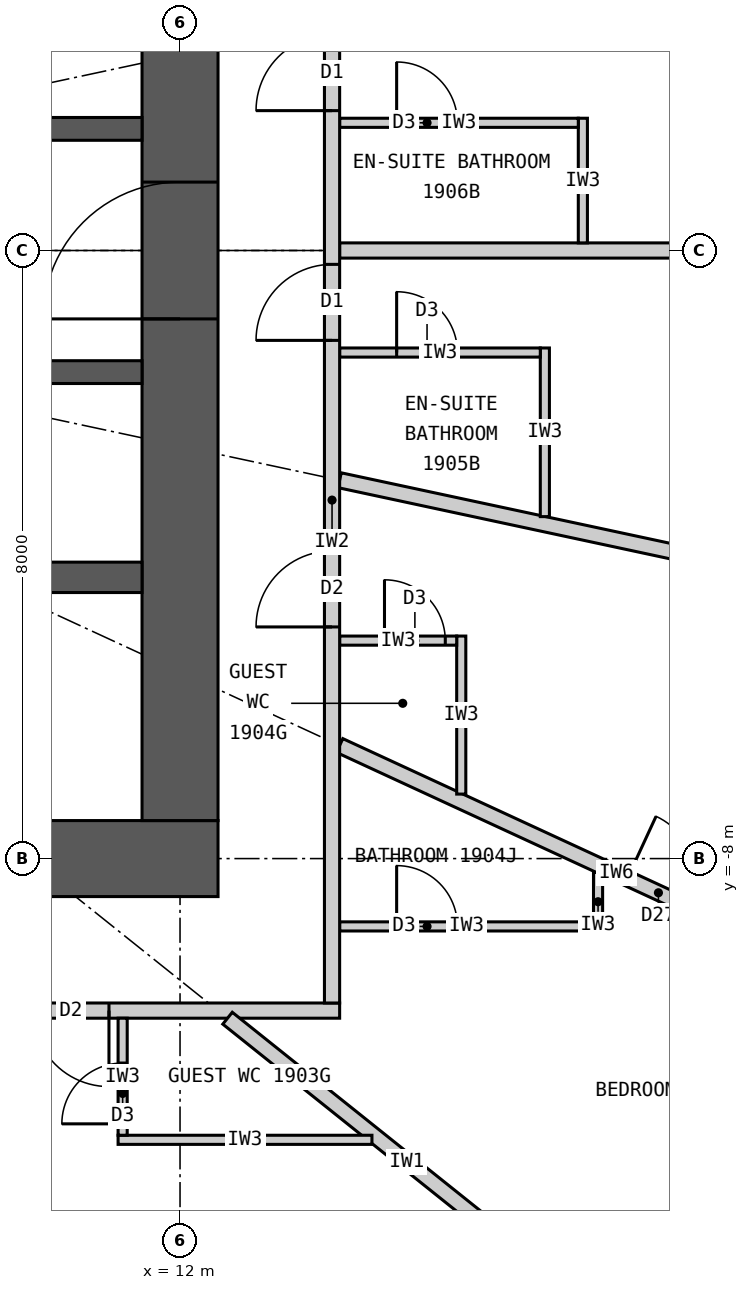
"""IFC4 building model, lengths in metres.
Left out: names, types, materials, properties, quantities, classifications, styles, units other than length and angle.
Written with IfcOpenShell. Run it as: python <this file> out.ifc"""

import sys

from ifc_helpers import new_model, si_unit, direction, frame, frame_2d, origin, place, context, subcontext, project, spatial, rectangle, extrude, element, fill, save


model = new_model("IFC4")
c1 = context("Model", 3, precision=1e-05, world=origin(), true_north=direction((0.0, 1.0)))
c2 = subcontext(c1, "Body", "Model", "MODEL_VIEW")
j1 = project(units=[si_unit("LENGTHUNIT", "METRE"), si_unit("PLANEANGLEUNIT", "RADIAN")], contexts=[c1])
p1 = place(None, origin())
s1 = spatial("IfcSite", under=j1, at=p1, CompositionType="ELEMENT")
p2 = place(p1, origin())
s2 = spatial("IfcBuilding", under=s1, at=p2, CompositionType="ELEMENT")
p3 = place(p2, frame((0.0, 0.0, 77.1)))
s3 = spatial("IfcBuildingStorey", under=s2, at=p3, CompositionType="ELEMENT", Elevation=77.1)
p4 = place(p3, frame((12.5, -8.0, 0.0), z_axis=(0.0, 0.0, 1.0), x_axis=(-1.0, 0.0, 0.0)))
e1 = element("IfcWall", 1, at=p4, inside=s3, PredefinedType="SHEAR", context=c2, shape_type="SweptSolid", body=[
    extrude(rectangle(XDim=25.0, YDim=1.0, at=frame_2d((12.5, 0.0))), origin(), (0.0, 0.0, 1.0), 3.3),
])
p5 = place(p4, frame((11.2, 0.0, 0.0)))
e2 = element("IfcOpeningElement", 2, at=p5, cuts=e1, PredefinedType="OPENING", context=c2, shape_type="SweptSolid", body=[
    extrude(rectangle(XDim=1.2, YDim=2.2, at=frame_2d((0.6, 1.1))), frame((0.0, 0.51, 0.0), z_axis=(0.0, -1.0, 0.0), x_axis=(1.0, 0.0, 0.0)), (0.0, 0.0, 1.0), 1.02),
])
p6 = place(p4, frame((18.8, 0.0, 0.0)))
e3 = element("IfcOpeningElement", 3, at=p6, cuts=e1, PredefinedType="OPENING", context=c2, shape_type="SweptSolid", body=[
    extrude(rectangle(XDim=0.9, YDim=2.2, at=frame_2d((0.45, 1.1))), frame((0.0, 0.51, 0.0), z_axis=(0.0, -1.0, 0.0), x_axis=(1.0, 0.0, 0.0)), (0.0, 0.0, 1.0), 1.02),
])
p7 = place(p3, frame((12.0, -7.5, 0.0), z_axis=(0.0, 0.0, 1.0), x_axis=(0.0, 1.0, 0.0)))
e4 = element("IfcWall", 4, at=p7, inside=s3, PredefinedType="SHEAR", context=c2, shape_type="SweptSolid", body=[
    extrude(rectangle(XDim=15.0, YDim=1.0, at=frame_2d((7.5, 0.0))), origin(), (0.0, 0.0, 1.0), 3.3),
])
p8 = place(p7, frame((6.6, 0.0, 0.0)))
e5 = element("IfcOpeningElement", 5, at=p8, cuts=e4, PredefinedType="OPENING", context=c2, shape_type="SweptSolid", body=[
    extrude(rectangle(XDim=1.8, YDim=2.2, at=frame_2d((0.9, 1.1))), frame((0.0, 0.51, 0.0), z_axis=(0.0, -1.0, 0.0), x_axis=(1.0, 0.0, 0.0)), (0.0, 0.0, 1.0), 1.02),
])
p9 = place(p3, frame((-11.5, 1.6, 0.0), z_axis=(0.0, 0.0, 1.0), x_axis=(1.0, 0.0, 0.0)))
e6 = element("IfcWall", 6, at=p9, inside=s3, PredefinedType="SHEAR", context=c2, shape_type="SweptSolid", body=[
    extrude(rectangle(XDim=23.0, YDim=0.3, at=frame_2d((11.5, 0.0))), origin(), (0.0, 0.0, 1.0), 3.3),
])
p10 = place(p9, frame((0.45, 0.0, 0.0)))
e7 = element("IfcOpeningElement", 7, at=p10, cuts=e6, PredefinedType="OPENING", context=c2, shape_type="SweptSolid", body=[
    extrude(rectangle(XDim=1.1, YDim=2.2, at=frame_2d((0.55, 1.1))), frame((0.0, 0.16, 0.0), z_axis=(0.0, -1.0, 0.0), x_axis=(1.0, 0.0, 0.0)), (0.0, 0.0, 1.0), 0.32),
])
p11 = place(p9, frame((3.45, 0.0, 0.0)))
e8 = element("IfcOpeningElement", 8, at=p11, cuts=e6, PredefinedType="OPENING", context=c2, shape_type="SweptSolid", body=[
    extrude(rectangle(XDim=1.1, YDim=2.2, at=frame_2d((0.55, 1.1))), frame((0.0, 0.16, 0.0), z_axis=(0.0, -1.0, 0.0), x_axis=(1.0, 0.0, 0.0)), (0.0, 0.0, 1.0), 0.32),
])
p12 = place(p9, frame((9.55, 0.0, 0.0)))
e9 = element("IfcOpeningElement", 9, at=p12, cuts=e6, PredefinedType="OPENING", context=c2, shape_type="SweptSolid", body=[
    extrude(rectangle(XDim=0.9, YDim=2.2, at=frame_2d((0.45, 1.1))), frame((0.0, 0.16, 0.0), z_axis=(0.0, -1.0, 0.0), x_axis=(1.0, 0.0, 0.0)), (0.0, 0.0, 1.0), 0.32),
])
p13 = place(p9, frame((15.55, 0.0, 0.0)))
e10 = element("IfcOpeningElement", 10, at=p13, cuts=e6, PredefinedType="OPENING", context=c2, shape_type="SweptSolid", body=[
    extrude(rectangle(XDim=0.9, YDim=2.2, at=frame_2d((0.45, 1.1))), frame((0.0, 0.16, 0.0), z_axis=(0.0, -1.0, 0.0), x_axis=(1.0, 0.0, 0.0)), (0.0, 0.0, 1.0), 0.32),
])
p14 = place(p3, frame((-11.5, -4.3, 0.0), z_axis=(0.0, 0.0, 1.0), x_axis=(1.0, 0.0, 0.0)))
e11 = element("IfcWall", 11, at=p14, inside=s3, PredefinedType="SHEAR", context=c2, shape_type="SweptSolid", body=[
    extrude(rectangle(XDim=23.0, YDim=0.4, at=frame_2d((11.5, 0.0))), origin(), (0.0, 0.0, 1.0), 3.3),
])
p15 = place(p3, frame((-11.5, -1.6, 0.0), z_axis=(0.0, 0.0, 1.0), x_axis=(1.0, 0.0, 0.0)))
e12 = element("IfcWall", 12, at=p15, inside=s3, PredefinedType="SHEAR", context=c2, shape_type="SweptSolid", body=[
    extrude(rectangle(XDim=23.0, YDim=0.3, at=frame_2d((11.5, 0.0))), origin(), (0.0, 0.0, 1.0), 3.3),
])
p16 = place(p15, frame((0.45, 0.0, 0.0)))
e13 = element("IfcOpeningElement", 13, at=p16, cuts=e12, PredefinedType="OPENING", context=c2, shape_type="SweptSolid", body=[
    extrude(rectangle(XDim=1.1, YDim=2.2, at=frame_2d((0.55, 1.1))), frame((0.0, 0.16, 0.0), z_axis=(0.0, -1.0, 0.0), x_axis=(1.0, 0.0, 0.0)), (0.0, 0.0, 1.0), 0.32),
])
p17 = place(p15, frame((3.45, 0.0, 0.0)))
e14 = element("IfcOpeningElement", 14, at=p17, cuts=e12, PredefinedType="OPENING", context=c2, shape_type="SweptSolid", body=[
    extrude(rectangle(XDim=1.1, YDim=2.2, at=frame_2d((0.55, 1.1))), frame((0.0, 0.16, 0.0), z_axis=(0.0, -1.0, 0.0), x_axis=(1.0, 0.0, 0.0)), (0.0, 0.0, 1.0), 0.32),
])
p18 = place(p15, frame((15.2, 0.0, 0.0)))
e15 = element("IfcOpeningElement", 15, at=p18, cuts=e12, PredefinedType="OPENING", context=c2, shape_type="SweptSolid", body=[
    extrude(rectangle(XDim=1.6, YDim=2.4, at=frame_2d((0.8, 1.2))), frame((0.0, 0.16, 0.0), z_axis=(0.0, -1.0, 0.0), x_axis=(1.0, 0.0, 0.0)), (0.0, 0.0, 1.0), 0.32),
])
p19 = place(p15, frame((6.55, 0.0, 0.0)))
e16 = element("IfcOpeningElement", 16, at=p19, cuts=e12, PredefinedType="OPENING", context=c2, shape_type="SweptSolid", body=[
    extrude(rectangle(XDim=0.9, YDim=2.2, at=frame_2d((0.45, 1.1))), frame((0.0, 0.16, 0.0), z_axis=(0.0, -1.0, 0.0), x_axis=(1.0, 0.0, 0.0)), (0.0, 0.0, 1.0), 0.32),
])
p20 = place(p15, frame((11.05, 0.0, 0.0)))
e17 = element("IfcOpeningElement", 17, at=p20, cuts=e12, PredefinedType="OPENING", context=c2, shape_type="SweptSolid", body=[
    extrude(rectangle(XDim=0.9, YDim=2.2, at=frame_2d((0.45, 1.1))), frame((0.0, 0.16, 0.0), z_axis=(0.0, -1.0, 0.0), x_axis=(1.0, 0.0, 0.0)), (0.0, 0.0, 1.0), 0.32),
])
p21 = place(p3, frame((14.1, -10.0, 0.0), z_axis=(0.0, 0.0, 1.0), x_axis=(-1.0, 0.0, 0.0)))
e18 = element("IfcWall", 18, at=p21, inside=s3, PredefinedType="PARTITIONING", context=c2, shape_type="SweptSolid", body=[
    extrude(rectangle(XDim=28.2, YDim=0.2, at=frame_2d((14.1, 0.0))), origin(), (0.0, 0.0, 1.0), 3.12),
])
p22 = place(p21, frame((24.165, 0.0, 0.0)))
e19 = element("IfcOpeningElement", 19, at=p22, cuts=e18, PredefinedType="OPENING", context=c2, shape_type="SweptSolid", body=[
    extrude(rectangle(XDim=1.0, YDim=2.2, at=frame_2d((0.5, 1.1))), frame((0.0, 0.11, 0.0), z_axis=(0.0, -1.0, 0.0), x_axis=(1.0, 0.0, 0.0)), (0.0, 0.0, 1.0), 0.22),
])
p23 = place(p21, frame((14.923, 0.0, 0.0)))
e20 = element("IfcOpeningElement", 20, at=p23, cuts=e18, PredefinedType="OPENING", context=c2, shape_type="SweptSolid", body=[
    extrude(rectangle(XDim=1.0, YDim=2.2, at=frame_2d((0.5, 1.1))), frame((0.0, 0.11, 0.0), z_axis=(0.0, -1.0, 0.0), x_axis=(1.0, 0.0, 0.0)), (0.0, 0.0, 1.0), 0.22),
])
p24 = place(p21, frame((3.035, 0.0, 0.0)))
e21 = element("IfcOpeningElement", 21, at=p24, cuts=e18, PredefinedType="OPENING", context=c2, shape_type="SweptSolid", body=[
    extrude(rectangle(XDim=1.0, YDim=2.2, at=frame_2d((0.5, 1.1))), frame((0.0, 0.11, 0.0), z_axis=(0.0, -1.0, 0.0), x_axis=(1.0, 0.0, 0.0)), (0.0, 0.0, 1.0), 0.22),
])
p25 = place(p3, frame((14.1, 0.0, 0.0), z_axis=(0.0, 0.0, 1.0), x_axis=(1.0, 0.0, 0.0)))
e22 = element("IfcWall", 22, at=p25, inside=s3, PredefinedType="PARTITIONING", context=c2, shape_type="SweptSolid", body=[
    extrude(rectangle(XDim=10.75, YDim=0.2, at=frame_2d((5.375, 0.0))), origin(), (0.0, 0.0, 1.0), 2.27),
])
p26 = place(p3, frame((7.289, -10.1, 0.0), z_axis=(0.0, 0.0, 1.0), x_axis=(0.585198353053, -0.810890182197, 0.0)))
e23 = element("IfcWall", 23, at=p26, inside=s3, PredefinedType="PARTITIONING", context=c2, shape_type="SweptSolid", body=[
    extrude(rectangle(XDim=8.36, YDim=0.2, at=frame_2d((4.18, 0.0))), origin(), (0.0, 0.0, 1.0), 2.32),
])
p27 = place(p26, frame((0.72, 0.0, 0.0)))
e24 = element("IfcOpeningElement", 24, at=p27, cuts=e23, PredefinedType="OPENING", context=c2, shape_type="SweptSolid", body=[
    extrude(rectangle(XDim=0.9, YDim=2.1, at=frame_2d((0.45, 1.05))), frame((0.0, 0.11, 0.0), z_axis=(0.0, -1.0, 0.0), x_axis=(1.0, 0.0, 0.0)), (0.0, 0.0, 1.0), 0.22),
])
p28 = place(p3, frame((12.625, -10.1, 0.0), z_axis=(0.0, 0.0, 1.0), x_axis=(0.780892451574, -0.624665493744, 0.0)))
e25 = element("IfcWall", 25, at=p28, inside=s3, PredefinedType="PARTITIONING", context=c2, shape_type="SweptSolid", body=[
    extrude(rectangle(XDim=6.045, YDim=0.2, at=frame_2d((3.022, 0.0))), origin(), (0.0, 0.0, 1.0), 2.32),
])
p29 = place(p3, frame((14.1, -6.512, 0.0), z_axis=(0.0, 0.0, 1.0), x_axis=(0.907832871056, -0.419332181247, 0.0)))
e26 = element("IfcWall", 26, at=p29, inside=s3, PredefinedType="PARTITIONING", context=c2, shape_type="SweptSolid", body=[
    extrude(rectangle(XDim=8.023, YDim=0.2, at=frame_2d((4.011, 0.0))), origin(), (0.0, 0.0, 1.0), 2.32),
])
p30 = place(p29, frame((4.17, 0.0, 0.0)))
e27 = element("IfcOpeningElement", 27, at=p30, cuts=e26, PredefinedType="OPENING", context=c2, shape_type="SweptSolid", body=[
    extrude(rectangle(XDim=0.9, YDim=2.1, at=frame_2d((0.45, 1.05))), frame((0.0, 0.11, 0.0), z_axis=(0.0, -1.0, 0.0), x_axis=(1.0, 0.0, 0.0)), (0.0, 0.0, 1.0), 0.22),
])
p31 = place(p3, frame((14.1, -3.022, 0.0), z_axis=(0.0, 0.0, 1.0), x_axis=(0.977790014929, -0.209586943072, 0.0)))
e28 = element("IfcWall", 28, at=p31, inside=s3, PredefinedType="PARTITIONING", context=c2, shape_type="SweptSolid", body=[
    extrude(rectangle(XDim=10.087, YDim=0.2, at=frame_2d((5.043, 0.0))), origin(), (0.0, 0.0, 1.0), 2.32),
])
p32 = place(p3, frame((14.525, -11.7, 0.0), z_axis=(0.0, 0.0, 1.0), x_axis=(-1.0, 0.0, 0.0)))
e29 = element("IfcWall", 29, at=p32, inside=s3, PredefinedType="PARTITIONING", context=c2, shape_type="SweptSolid", body=[
    extrude(rectangle(XDim=3.34, YDim=0.12, at=frame_2d((1.67, 0.0))), origin(), (0.0, 0.0, 1.0), 3.12),
])
p33 = place(p3, frame((11.245, -10.1, 0.0), z_axis=(0.0, 0.0, 1.0), x_axis=(0.0, -1.0, 0.0)))
e30 = element("IfcWall", 30, at=p33, inside=s3, PredefinedType="PARTITIONING", context=c2, shape_type="SweptSolid", body=[
    extrude(rectangle(XDim=1.54, YDim=0.12, at=frame_2d((0.77, 0.0))), origin(), (0.0, 0.0, 1.0), 3.12),
])
p34 = place(p33, frame((0.59, 0.0, 0.0)))
e31 = element("IfcOpeningElement", 31, at=p34, cuts=e30, PredefinedType="OPENING", context=c2, shape_type="SweptSolid", body=[
    extrude(rectangle(XDim=0.8, YDim=2.1, at=frame_2d((0.4, 1.05))), frame((0.0, 0.07, 0.0), z_axis=(0.0, -1.0, 0.0), x_axis=(1.0, 0.0, 0.0)), (0.0, 0.0, 1.0), 0.14),
])
p35 = place(p3, frame((17.5, -8.183, 0.0), z_axis=(0.0, 0.0, 1.0), x_axis=(0.0, -1.0, 0.0)))
e32 = element("IfcWall", 32, at=p35, inside=s3, PredefinedType="PARTITIONING", context=c2, shape_type="SweptSolid", body=[
    extrude(rectangle(XDim=0.77, YDim=0.12, at=frame_2d((0.385, 0.0))), origin(), (0.0, 0.0, 1.0), 3.12),
])
p36 = place(p3, frame((14.1, -8.893, 0.0), z_axis=(0.0, 0.0, 1.0), x_axis=(1.0, 0.0, 0.0)))
e33 = element("IfcWall", 33, at=p36, inside=s3, PredefinedType="PARTITIONING", context=c2, shape_type="SweptSolid", body=[
    extrude(rectangle(XDim=3.34, YDim=0.12, at=frame_2d((1.67, 0.0))), origin(), (0.0, 0.0, 1.0), 3.12),
])
p37 = place(p36, frame((0.75, 0.0, 0.0)))
e34 = element("IfcOpeningElement", 34, at=p37, cuts=e33, PredefinedType="OPENING", context=c2, shape_type="SweptSolid", body=[
    extrude(rectangle(XDim=0.8, YDim=2.1, at=frame_2d((0.4, 1.05))), frame((0.0, 0.07, 0.0), z_axis=(0.0, -1.0, 0.0), x_axis=(1.0, 0.0, 0.0)), (0.0, 0.0, 1.0), 0.14),
])
p38 = place(p3, frame((15.7, -7.152, 0.0), z_axis=(0.0, 0.0, 1.0), x_axis=(0.0, 1.0, 0.0)))
e35 = element("IfcWall", 35, at=p38, inside=s3, PredefinedType="PARTITIONING", context=c2, shape_type="SweptSolid", body=[
    extrude(rectangle(XDim=2.079, YDim=0.12, at=frame_2d((1.04, 0.0))), origin(), (0.0, 0.0, 1.0), 3.12),
])
p39 = place(p3, frame((14.1, -5.133, 0.0), z_axis=(0.0, 0.0, 1.0), x_axis=(1.0, 0.0, 0.0)))
e36 = element("IfcWall", 36, at=p39, inside=s3, PredefinedType="PARTITIONING", context=c2, shape_type="SweptSolid", body=[
    extrude(rectangle(XDim=1.54, YDim=0.12, at=frame_2d((0.77, 0.0))), origin(), (0.0, 0.0, 1.0), 3.12),
])
p40 = place(p39, frame((0.59, 0.0, 0.0)))
e37 = element("IfcOpeningElement", 37, at=p40, cuts=e36, PredefinedType="OPENING", context=c2, shape_type="SweptSolid", body=[
    extrude(rectangle(XDim=0.8, YDim=2.1, at=frame_2d((0.4, 1.05))), frame((0.0, 0.07, 0.0), z_axis=(0.0, -1.0, 0.0), x_axis=(1.0, 0.0, 0.0)), (0.0, 0.0, 1.0), 0.14),
])
p41 = place(p3, frame((16.8, -3.501, 0.0), z_axis=(0.0, 0.0, 1.0), x_axis=(0.0, 1.0, 0.0)))
e38 = element("IfcWall", 38, at=p41, inside=s3, PredefinedType="PARTITIONING", context=c2, shape_type="SweptSolid", body=[
    extrude(rectangle(XDim=2.219, YDim=0.12, at=frame_2d((1.109, 0.0))), origin(), (0.0, 0.0, 1.0), 3.12),
])
p42 = place(p3, frame((14.1, -1.343, 0.0), z_axis=(0.0, 0.0, 1.0), x_axis=(1.0, 0.0, 0.0)))
e39 = element("IfcWall", 39, at=p42, inside=s3, PredefinedType="PARTITIONING", context=c2, shape_type="SweptSolid", body=[
    extrude(rectangle(XDim=2.64, YDim=0.12, at=frame_2d((1.32, 0.0))), origin(), (0.0, 0.0, 1.0), 3.12),
])
p43 = place(p42, frame((0.75, 0.0, 0.0)))
e40 = element("IfcOpeningElement", 40, at=p43, cuts=e39, PredefinedType="OPENING", context=c2, shape_type="SweptSolid", body=[
    extrude(rectangle(XDim=0.8, YDim=2.1, at=frame_2d((0.4, 1.05))), frame((0.0, 0.07, 0.0), z_axis=(0.0, -1.0, 0.0), x_axis=(1.0, 0.0, 0.0)), (0.0, 0.0, 1.0), 0.14),
])
p44 = place(p3, frame((17.3, 0.1, 0.0), z_axis=(0.0, 0.0, 1.0), x_axis=(0.0, 1.0, 0.0)))
e41 = element("IfcWall", 41, at=p44, inside=s3, PredefinedType="PARTITIONING", context=c2, shape_type="SweptSolid", body=[
    extrude(rectangle(XDim=1.64, YDim=0.12, at=frame_2d((0.82, 0.0))), origin(), (0.0, 0.0, 1.0), 3.12),
])
p45 = place(p3, frame((14.1, 1.68, 0.0), z_axis=(0.0, 0.0, 1.0), x_axis=(1.0, 0.0, 0.0)))
e42 = element("IfcWall", 42, at=p45, inside=s3, PredefinedType="PARTITIONING", context=c2, shape_type="SweptSolid", body=[
    extrude(rectangle(XDim=3.14, YDim=0.12, at=frame_2d((1.57, 0.0))), origin(), (0.0, 0.0, 1.0), 3.12),
])
p46 = place(p45, frame((0.75, 0.0, 0.0)))
e43 = element("IfcOpeningElement", 43, at=p46, cuts=e42, PredefinedType="OPENING", context=c2, shape_type="SweptSolid", body=[
    extrude(rectangle(XDim=0.8, YDim=2.1, at=frame_2d((0.4, 1.05))), frame((0.0, 0.07, 0.0), z_axis=(0.0, -1.0, 0.0), x_axis=(1.0, 0.0, 0.0)), (0.0, 0.0, 1.0), 0.14),
])
p47 = place(p3, frame((14.0, -9.9, 0.0), z_axis=(0.0, 0.0, 1.0), x_axis=(0.0, 1.0, 0.0)))
e44 = element("IfcWall", 44, at=p47, inside=s3, PredefinedType="PARTITIONING", context=c2, shape_type="SweptSolid", body=[
    extrude(rectangle(XDim=13.232, YDim=0.2, at=frame_2d((6.616, 0.0))), origin(), (0.0, 0.0, 1.0), 3.12),
])
p48 = place(p47, frame((4.948, 0.0, 0.0)))
e45 = element("IfcOpeningElement", 45, at=p48, cuts=e44, PredefinedType="OPENING", context=c2, shape_type="SweptSolid", body=[
    extrude(rectangle(XDim=1.0, YDim=2.2, at=frame_2d((0.5, 1.1))), frame((0.0, 0.11, 0.0), z_axis=(0.0, -1.0, 0.0), x_axis=(1.0, 0.0, 0.0)), (0.0, 0.0, 1.0), 0.22),
])
p49 = place(p47, frame((8.718, 0.0, 0.0)))
e46 = element("IfcOpeningElement", 46, at=p49, cuts=e44, PredefinedType="OPENING", context=c2, shape_type="SweptSolid", body=[
    extrude(rectangle(XDim=1.0, YDim=2.2, at=frame_2d((0.5, 1.1))), frame((0.0, 0.11, 0.0), z_axis=(0.0, -1.0, 0.0), x_axis=(1.0, 0.0, 0.0)), (0.0, 0.0, 1.0), 0.22),
])
p50 = place(p47, frame((11.74, 0.0, 0.0)))
e47 = element("IfcOpeningElement", 47, at=p50, cuts=e44, PredefinedType="OPENING", context=c2, shape_type="SweptSolid", body=[
    extrude(rectangle(XDim=1.0, YDim=2.2, at=frame_2d((0.5, 1.1))), frame((0.0, 0.11, 0.0), z_axis=(0.0, -1.0, 0.0), x_axis=(1.0, 0.0, 0.0)), (0.0, 0.0, 1.0), 0.22),
])
p51 = place(p34, origin())
e48 = element("IfcDoor", 48, at=p51, inside=s3, OperationType="SINGLE_SWING_RIGHT", PredefinedType="DOOR", context=c2, shape_type="SweptSolid", body=[
    extrude(rectangle(XDim=0.8, YDim=2.1, at=frame_2d((0.4, 1.05))), frame((0.0, 0.025, 0.0), z_axis=(0.0, -1.0, 0.0), x_axis=(1.0, 0.0, 0.0)), (0.0, 0.0, 1.0), 0.05),
])
fill(e31, e48)
p52 = place(p24, origin())
e49 = element("IfcDoor", 49, at=p52, inside=s3, OperationType="SINGLE_SWING_LEFT", PredefinedType="DOOR", context=c2, shape_type="SweptSolid", body=[
    extrude(rectangle(XDim=1.0, YDim=2.2, at=frame_2d((0.5, 1.1))), frame((0.0, 0.025, 0.0), z_axis=(0.0, -1.0, 0.0), x_axis=(1.0, 0.0, 0.0)), (0.0, 0.0, 1.0), 0.05),
])
fill(e21, e49)
p53 = place(p37, origin())
e50 = element("IfcDoor", 50, at=p53, inside=s3, OperationType="SINGLE_SWING_LEFT", PredefinedType="DOOR", context=c2, shape_type="SweptSolid", body=[
    extrude(rectangle(XDim=0.8, YDim=2.1, at=frame_2d((0.4, 1.05))), frame((0.0, 0.025, 0.0), z_axis=(0.0, -1.0, 0.0), x_axis=(1.0, 0.0, 0.0)), (0.0, 0.0, 1.0), 0.05),
])
fill(e34, e50)
p54 = place(p40, origin())
e51 = element("IfcDoor", 51, at=p54, inside=s3, OperationType="SINGLE_SWING_LEFT", PredefinedType="DOOR", context=c2, shape_type="SweptSolid", body=[
    extrude(rectangle(XDim=0.8, YDim=2.1, at=frame_2d((0.4, 1.05))), frame((0.0, 0.025, 0.0), z_axis=(0.0, -1.0, 0.0), x_axis=(1.0, 0.0, 0.0)), (0.0, 0.0, 1.0), 0.05),
])
fill(e37, e51)
p55 = place(p48, origin())
e52 = element("IfcDoor", 52, at=p55, inside=s3, OperationType="SINGLE_SWING_LEFT", PredefinedType="DOOR", context=c2, shape_type="SweptSolid", body=[
    extrude(rectangle(XDim=1.0, YDim=2.2, at=frame_2d((0.5, 1.1))), frame((0.0, 0.025, 0.0), z_axis=(0.0, -1.0, 0.0), x_axis=(1.0, 0.0, 0.0)), (0.0, 0.0, 1.0), 0.05),
])
fill(e45, e52)
p56 = place(p30, origin())
e53 = element("IfcDoor", 53, at=p56, inside=s3, OperationType="SINGLE_SWING_LEFT", PredefinedType="DOOR", context=c2, shape_type="SweptSolid", body=[
    extrude(rectangle(XDim=0.9, YDim=2.1, at=frame_2d((0.45, 1.05))), frame((0.0, 0.025, 0.0), z_axis=(0.0, -1.0, 0.0), x_axis=(1.0, 0.0, 0.0)), (0.0, 0.0, 1.0), 0.05),
])
fill(e27, e53)
p57 = place(p43, origin())
e54 = element("IfcDoor", 54, at=p57, inside=s3, OperationType="SINGLE_SWING_LEFT", PredefinedType="DOOR", context=c2, shape_type="SweptSolid", body=[
    extrude(rectangle(XDim=0.8, YDim=2.1, at=frame_2d((0.4, 1.05))), frame((0.0, 0.025, 0.0), z_axis=(0.0, -1.0, 0.0), x_axis=(1.0, 0.0, 0.0)), (0.0, 0.0, 1.0), 0.05),
])
fill(e40, e54)
p58 = place(p49, origin())
e55 = element("IfcDoor", 55, at=p58, inside=s3, OperationType="SINGLE_SWING_LEFT", PredefinedType="DOOR", context=c2, shape_type="SweptSolid", body=[
    extrude(rectangle(XDim=1.0, YDim=2.2, at=frame_2d((0.5, 1.1))), frame((0.0, 0.025, 0.0), z_axis=(0.0, -1.0, 0.0), x_axis=(1.0, 0.0, 0.0)), (0.0, 0.0, 1.0), 0.05),
])
fill(e46, e55)
p59 = place(p46, origin())
e56 = element("IfcDoor", 56, at=p59, inside=s3, OperationType="SINGLE_SWING_LEFT", PredefinedType="DOOR", context=c2, shape_type="SweptSolid", body=[
    extrude(rectangle(XDim=0.8, YDim=2.1, at=frame_2d((0.4, 1.05))), frame((0.0, 0.025, 0.0), z_axis=(0.0, -1.0, 0.0), x_axis=(1.0, 0.0, 0.0)), (0.0, 0.0, 1.0), 0.05),
])
fill(e43, e56)
p60 = place(p50, origin())
e57 = element("IfcDoor", 57, at=p60, inside=s3, OperationType="SINGLE_SWING_LEFT", PredefinedType="DOOR", context=c2, shape_type="SweptSolid", body=[
    extrude(rectangle(XDim=1.0, YDim=2.2, at=frame_2d((0.5, 1.1))), frame((0.0, 0.025, 0.0), z_axis=(0.0, -1.0, 0.0), x_axis=(1.0, 0.0, 0.0)), (0.0, 0.0, 1.0), 0.05),
])
fill(e47, e57)
p61 = place(p8, origin())
e58 = element("IfcDoor", 58, at=p61, inside=s3, OperationType="DOUBLE_DOOR_DOUBLE_SWING", PredefinedType="DOOR", context=c2, shape_type="SweptSolid", body=[
    extrude(rectangle(XDim=1.8, YDim=2.2, at=frame_2d((0.9, 1.1))), frame((0.0, 0.025, 0.0), z_axis=(0.0, -1.0, 0.0), x_axis=(1.0, 0.0, 0.0)), (0.0, 0.0, 1.0), 0.05),
])
fill(e5, e58)
save(model, sys.argv[1])
